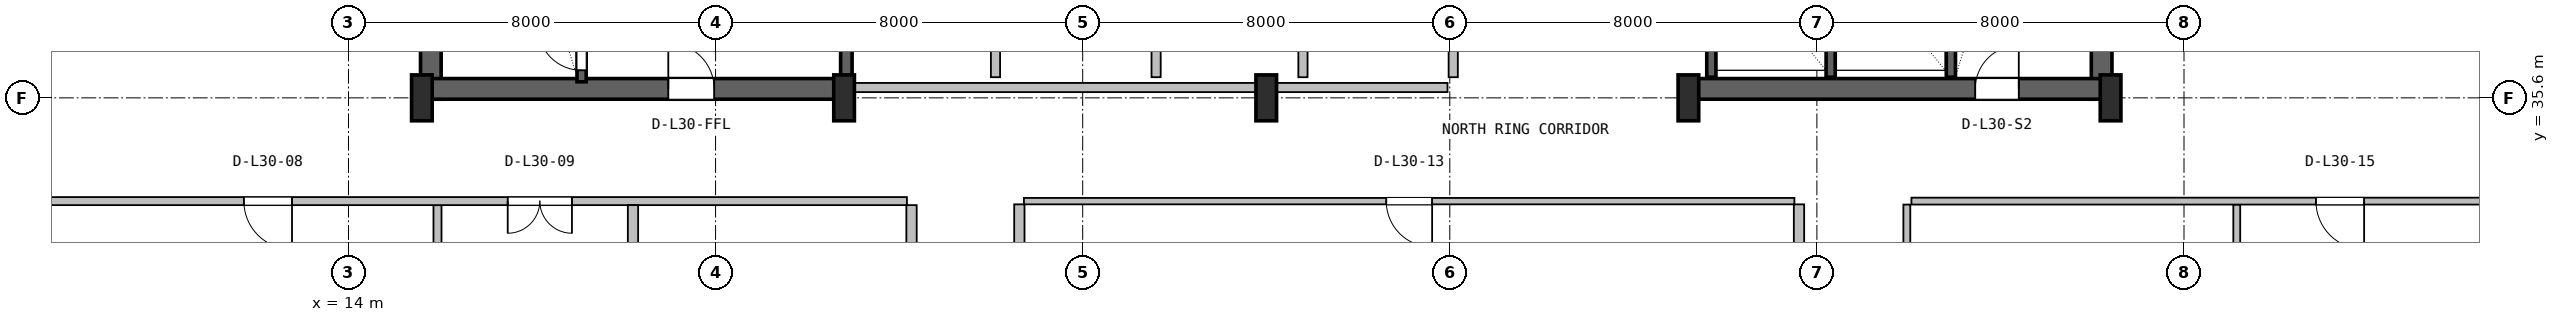
"""IFC4 building model, lengths in metres.
Left out: names, types, materials, properties, quantities, classifications, styles, units other than length and angle.
Written with IfcOpenShell. Run it as: python <this file> out.ifc"""

import sys

from ifc_helpers import new_model, si_unit, direction, frame, frame_2d, origin, origin_2d, place, context, subcontext, project, spatial, rectangle, i_section, extrude, source, transform, mapped, element, fill, save


model = new_model("IFC4")
c1 = context("Model", 3, precision=1e-05, world=origin(), true_north=direction((0.0, 1.0)))
c2 = subcontext(c1, "Body", "Model", "MODEL_VIEW")
j1 = project(units=[si_unit("LENGTHUNIT", "METRE"), si_unit("PLANEANGLEUNIT", "RADIAN")], contexts=[c1])
p1 = place(None, origin())
s1 = spatial("IfcSite", under=j1, at=p1, CompositionType="ELEMENT")
p2 = place(p1, origin())
s2 = spatial("IfcBuilding", under=s1, at=p2, CompositionType="ELEMENT")
p3 = place(p2, frame((0.0, 0.0, 125.8)))
s3 = spatial("IfcBuildingStorey", under=s2, at=p3, CompositionType="ELEMENT", Elevation=125.8)
for number, where, z_axis, x_axis in (
    (1, (15.795, 35.57, 0.0), (0.0, 0.0, 1.0), (0.0, 1.0, 0.0)),
    (2, (52.205, 35.57, 0.0), (0.0, 0.0, 1.0), (0.0, 1.0, 0.0)),
):
    element("IfcWall", number, at=place(p3, frame(where, z_axis=z_axis, x_axis=x_axis)), inside=s3, PredefinedType="SHEAR", context=c2, shape_type="SweptSolid", body=[
        extrude(rectangle(XDim=11.23, YDim=0.45, at=frame_2d((5.615, 0.0))), origin(), (0.0, 0.0, 1.0), 3.55),
    ])
p4 = place(p3, frame((15.57, 35.795, 0.0), z_axis=(0.0, 0.0, 1.0), x_axis=(1.0, 0.0, 0.0)))
e3 = element("IfcWall", 3, at=p4, inside=s3, PredefinedType="SHEAR", context=c2, shape_type="SweptSolid", body=[
    extrude(rectangle(XDim=9.23, YDim=0.45, at=frame_2d((4.615, 0.0))), origin(), (0.0, 0.0, 1.0), 3.55),
])
p5 = place(p4, frame((5.4, 0.0, 0.0)))
e4 = element("IfcOpeningElement", 4, at=p5, cuts=e3, PredefinedType="OPENING", context=c2, shape_type="SweptSolid", body=[
    extrude(rectangle(XDim=1.0, YDim=2.1, at=frame_2d((0.5, 1.05))), frame((0.0, 0.235, 0.0), z_axis=(0.0, -1.0, 0.0), x_axis=(1.0, 0.0, 0.0)), (0.0, 0.0, 1.0), 0.47),
])
p6 = place(p3, frame((43.2, 35.795, 0.0), z_axis=(0.0, 0.0, 1.0), x_axis=(1.0, 0.0, 0.0)))
e5 = element("IfcWall", 5, at=p6, inside=s3, PredefinedType="SHEAR", context=c2, shape_type="SweptSolid", body=[
    extrude(rectangle(XDim=9.23, YDim=0.45, at=frame_2d((4.615, 0.0))), origin(), (0.0, 0.0, 1.0), 3.55),
])
p7 = place(p6, frame((6.25, 0.0, 0.0)))
e6 = element("IfcOpeningElement", 6, at=p7, cuts=e5, PredefinedType="OPENING", context=c2, shape_type="SweptSolid", body=[
    extrude(rectangle(XDim=0.95, YDim=2.1, at=frame_2d((0.475, 1.05))), frame((0.0, 0.235, 0.0), z_axis=(0.0, -1.0, 0.0), x_axis=(1.0, 0.0, 0.0)), (0.0, 0.0, 1.0), 0.47),
])
m1 = source(origin(), c2, "Body", "SweptSolid", [
    extrude(i_section(OverallWidth=0.45, OverallDepth=1.0, WebThickness=0.016, FlangeThickness=0.03, FilletRadius=0.016, at=origin_2d()), origin(), (0.0, 0.0, 1.0), 3.8),
])
for number, where, z_axis, x_axis in (
    (7, (15.6, 35.6, 0.0), (0.0, 0.0, 1.0), (1.0, 0.0, 0.0)),
    (8, (24.8, 35.6, 0.0), (0.0, 0.0, 1.0), (1.0, 0.0, 0.0)),
    (9, (34.0, 35.6, 0.0), (0.0, 0.0, 1.0), (1.0, 0.0, 0.0)),
    (10, (43.2, 35.6, 0.0), (0.0, 0.0, 1.0), (1.0, 0.0, 0.0)),
    (11, (52.4, 35.6, 0.0), (0.0, 0.0, 1.0), (1.0, 0.0, 0.0)),
):
    element("IfcColumn", number, at=place(p3, frame(where, z_axis=z_axis, x_axis=x_axis)), inside=s3, PredefinedType="COLUMN", context=c2, shape_type="MappedRepresentation", body=[
        mapped(m1, transform((0.0, 0.0, 0.0), x_axis=(1.0, 0.0, 0.0), y_axis=(0.0, 1.0, 0.0), z_axis=(0.0, 0.0, 1.0), scale=1.0)),
    ])
p8 = place(p3, frame((19.08, 35.95, 0.0), z_axis=(0.0, 0.0, 1.0), x_axis=(0.0, 1.0, 0.0)))
e12 = element("IfcWall", 12, at=p8, inside=s3, PredefinedType="SHEAR", context=c2, shape_type="SweptSolid", body=[
    extrude(rectangle(XDim=9.65, YDim=0.2, at=frame_2d((4.825, 0.0))), origin(), (0.0, 0.0, 1.0), 3.55),
])
p9 = place(p8, frame((0.25, 0.0, 0.0)))
e13 = element("IfcOpeningElement", 13, at=p9, cuts=e12, PredefinedType="OPENING", context=c2, shape_type="SweptSolid", body=[
    extrude(rectangle(XDim=0.95, YDim=2.1, at=frame_2d((0.475, 1.05))), frame((0.0, 0.11, 0.0), z_axis=(0.0, -1.0, 0.0), x_axis=(1.0, 0.0, 0.0)), (0.0, 0.0, 1.0), 0.22),
])
p10 = place(p3, frame((24.85, 36.05, 0.0), z_axis=(0.0, 0.0, 1.0), x_axis=(0.0, 1.0, 0.0)))
e14 = element("IfcWall", 14, at=p10, inside=s3, PredefinedType="SHEAR", context=c2, shape_type="SweptSolid", body=[
    extrude(rectangle(XDim=10.45, YDim=0.25, at=frame_2d((5.225, 0.0))), origin(), (0.0, 0.0, 1.0), 3.55),
])
p11 = place(p3, frame((48.92, 36.05, 0.0), z_axis=(0.0, 0.0, 1.0), x_axis=(0.0, 1.0, 0.0)))
e15 = element("IfcWall", 15, at=p11, inside=s3, PredefinedType="SHEAR", context=c2, shape_type="SweptSolid", body=[
    extrude(rectangle(XDim=10.5, YDim=0.2, at=frame_2d((5.25, 0.0))), origin(), (0.0, 0.0, 1.0), 3.55),
])
for number, where, z_axis, x_axis in (
    (16, (43.7, 36.05, 0.0), (0.0, 0.0, 1.0), (0.0, 1.0, 0.0)),
    (17, (46.3, 36.05, 0.0), (0.0, 0.0, 1.0), (0.0, 1.0, 0.0)),
):
    element("IfcWall", number, at=place(p3, frame(where, z_axis=z_axis, x_axis=x_axis)), inside=s3, PredefinedType="SHEAR", context=c2, shape_type="SweptSolid", body=[
        extrude(rectangle(XDim=3.05, YDim=0.2, at=frame_2d((1.525, 0.0))), origin(), (0.0, 0.0, 1.0), 3.55),
    ])
p12 = place(p3, frame((25.0, 35.825, 0.0), z_axis=(0.0, 0.0, 1.0), x_axis=(1.0, 0.0, 0.0)))
e18 = element("IfcWall", 18, at=p12, inside=s3, PredefinedType="SOLIDWALL", context=c2, shape_type="SweptSolid", body=[
    extrude(rectangle(XDim=12.95, YDim=0.2, at=frame_2d((6.475, 0.0))), origin(), (0.0, 0.0, 1.0), 2.325),
])
for number, where, z_axis, x_axis in (
    (19, (28.1, 36.05, 0.0), (0.0, 0.0, 1.0), (0.0, 1.0, 0.0)),
    (20, (31.6, 36.05, 0.0), (0.0, 0.0, 1.0), (0.0, 1.0, 0.0)),
):
    element("IfcWall", number, at=place(p3, frame(where, z_axis=z_axis, x_axis=x_axis)), inside=s3, PredefinedType="PLUMBINGWALL", context=c2, shape_type="SweptSolid", body=[
        extrude(rectangle(XDim=3.1, YDim=0.2, at=frame_2d((1.55, 0.0))), origin(), (0.0, 0.0, 1.0), 3.53),
    ])
for number, where, z_axis, x_axis in (
    (21, (34.8, 36.05, 0.0), (0.0, 0.0, 1.0), (0.0, 1.0, 0.0)),
    (22, (38.075, 36.05, 0.0), (0.0, 0.0, 1.0), (0.0, 1.0, 0.0)),
):
    element("IfcWall", number, at=place(p3, frame(where, z_axis=z_axis, x_axis=x_axis)), inside=s3, PredefinedType="SOLIDWALL", context=c2, shape_type="SweptSolid", body=[
        extrude(rectangle(XDim=3.1, YDim=0.2, at=frame_2d((1.55, 0.0))), origin(), (0.0, 0.0, 1.0), 3.53),
    ])
p13 = place(p3, frame((15.94, 15.183, 0.0), z_axis=(0.0, 0.0, 1.0), x_axis=(0.0, 1.0, 0.0)))
e23 = element("IfcWall", 23, at=p13, inside=s3, PredefinedType="PARTITIONING", context=c2, shape_type="SweptSolid", body=[
    extrude(rectangle(XDim=18.08, YDim=0.175, at=frame_2d((9.04, 0.0))), origin(), (0.0, 0.0, 1.0), 3.222),
])
p14 = place(p3, frame((4.68, 33.35, 0.0), z_axis=(0.0, 0.0, 1.0), x_axis=(1.0, 0.0, 0.0)))
e24 = element("IfcWall", 24, at=p14, inside=s3, PredefinedType="PARTITIONING", context=c2, shape_type="SweptSolid", body=[
    extrude(rectangle(XDim=21.49, YDim=0.175, at=frame_2d((10.745, 0.0))), origin(), (0.0, 0.0, 1.0), 2.83),
])
p15 = place(p14, frame((7.04, 0.0, 0.0)))
e25 = element("IfcOpeningElement", 25, at=p15, cuts=e24, PredefinedType="OPENING", context=c2, shape_type="SweptSolid", body=[
    extrude(rectangle(XDim=1.05, YDim=2.1, at=frame_2d((0.525, 1.05))), frame((0.0, 0.098, 0.0), z_axis=(0.0, -1.0, 0.0), x_axis=(1.0, 0.0, 0.0)), (0.0, 0.0, 1.0), 0.195),
])
p16 = place(p14, frame((12.79, 0.0, 0.0)))
e26 = element("IfcOpeningElement", 26, at=p16, cuts=e24, PredefinedType="OPENING", context=c2, shape_type="SweptSolid", body=[
    extrude(rectangle(XDim=1.4, YDim=2.12, at=frame_2d((0.7, 1.06))), frame((0.0, 0.098, 0.0), z_axis=(0.0, -1.0, 0.0), x_axis=(1.0, 0.0, 0.0)), (0.0, 0.0, 1.0), 0.195),
])
p17 = place(p3, frame((20.2, 15.183, 0.0), z_axis=(0.0, 0.0, 1.0), x_axis=(0.0, 1.0, 0.0)))
e27 = element("IfcWall", 27, at=p17, inside=s3, PredefinedType="PARTITIONING", context=c2, shape_type="SweptSolid", body=[
    extrude(rectangle(XDim=18.08, YDim=0.225, at=frame_2d((9.04, 0.0))), origin(), (0.0, 0.0, 1.0), 3.222),
])
p18 = place(p3, frame((26.27, 15.183, 0.0), z_axis=(0.0, 0.0, 1.0), x_axis=(0.0, 1.0, 0.0)))
e28 = element("IfcWall", 28, at=p18, inside=s3, PredefinedType="PARTITIONING", context=c2, shape_type="SweptSolid", body=[
    extrude(rectangle(XDim=18.08, YDim=0.225, at=frame_2d((9.04, 0.0))), origin(), (0.0, 0.0, 1.0), 2.83),
])
p19 = place(p18, frame((8.334, 0.0, 0.0)))
e29 = element("IfcOpeningElement", 29, at=p19, cuts=e28, PredefinedType="OPENING", context=c2, shape_type="SweptSolid", body=[
    extrude(rectangle(XDim=1.4, YDim=2.12, at=frame_2d((0.7, 1.06))), frame((0.0, 0.123, 0.0), z_axis=(0.0, -1.0, 0.0), x_axis=(1.0, 0.0, 0.0)), (0.0, 0.0, 1.0), 0.245),
])
p20 = place(p3, frame((45.61, 17.533, 0.0), z_axis=(0.0, 0.0, 1.0), x_axis=(0.0, 1.0, 0.0)))
e30 = element("IfcWall", 30, at=p20, inside=s3, PredefinedType="PARTITIONING", context=c2, shape_type="SweptSolid", body=[
    extrude(rectangle(XDim=15.747, YDim=0.225, at=frame_2d((7.874, 0.0))), origin(), (0.0, 0.0, 1.0), 3.222),
])
p21 = place(p20, frame((8.162, 0.0, 0.0)))
e31 = element("IfcOpeningElement", 31, at=p21, cuts=e30, PredefinedType="OPENING", context=c2, shape_type="SweptSolid", body=[
    extrude(rectangle(XDim=0.92, YDim=2.08, at=frame_2d((0.46, 1.04))), frame((0.0, 0.123, 0.0), z_axis=(0.0, -1.0, 0.0), x_axis=(1.0, 0.0, 0.0)), (0.0, 0.0, 1.0), 0.245),
])
p22 = place(p3, frame((28.62, 17.533, 0.0), z_axis=(0.0, 0.0, 1.0), x_axis=(0.0, 1.0, 0.0)))
e32 = element("IfcWall", 32, at=p22, inside=s3, PredefinedType="PARTITIONING", context=c2, shape_type="SweptSolid", body=[
    extrude(rectangle(XDim=15.747, YDim=0.225, at=frame_2d((7.874, 0.0))), origin(), (0.0, 0.0, 1.0), 2.83),
])
p23 = place(p3, frame((28.72, 33.35, 0.0), z_axis=(0.0, 0.0, 1.0), x_axis=(1.0, 0.0, 0.0)))
e33 = element("IfcWall", 33, at=p23, inside=s3, PredefinedType="PARTITIONING", context=c2, shape_type="SweptSolid", body=[
    extrude(rectangle(XDim=16.79, YDim=0.14, at=frame_2d((8.395, 0.0))), origin(), (0.0, 0.0, 1.0), 2.83),
])
p24 = place(p23, frame((7.895, 0.0, 0.0)))
e34 = element("IfcOpeningElement", 34, at=p24, cuts=e33, PredefinedType="OPENING", context=c2, shape_type="SweptSolid", body=[
    extrude(rectangle(XDim=1.0, YDim=2.1, at=frame_2d((0.5, 1.05))), frame((0.0, 0.08, 0.0), z_axis=(0.0, -1.0, 0.0), x_axis=(1.0, 0.0, 0.0)), (0.0, 0.0, 1.0), 0.16),
])
p25 = place(p3, frame((55.15, 15.183, 0.0), z_axis=(0.0, 0.0, 1.0), x_axis=(0.0, 1.0, 0.0)))
e35 = element("IfcWall", 35, at=p25, inside=s3, PredefinedType="PARTITIONING", context=c2, shape_type="SweptSolid", body=[
    extrude(rectangle(XDim=18.092, YDim=0.15, at=frame_2d((9.046, 0.0))), origin(), (0.0, 0.0, 1.0), 3.222),
])
p26 = place(p3, frame((48.06, 33.35, 0.0), z_axis=(0.0, 0.0, 1.0), x_axis=(1.0, 0.0, 0.0)))
e36 = element("IfcWall", 36, at=p26, inside=s3, PredefinedType="PARTITIONING", context=c2, shape_type="SweptSolid", body=[
    extrude(rectangle(XDim=15.26, YDim=0.15, at=frame_2d((7.63, 0.0))), origin(), (0.0, 0.0, 1.0), 3.108),
])
p27 = place(p26, frame((8.815, 0.0, 0.0)))
e37 = element("IfcOpeningElement", 37, at=p27, cuts=e36, PredefinedType="OPENING", context=c2, shape_type="SweptSolid", body=[
    extrude(rectangle(XDim=1.05, YDim=2.1, at=frame_2d((0.525, 1.05))), frame((0.0, 0.085, 0.0), z_axis=(0.0, -1.0, 0.0), x_axis=(1.0, 0.0, 0.0)), (0.0, 0.0, 1.0), 0.17),
])
p28 = place(p3, frame((47.96, 15.183, 0.0), z_axis=(0.0, 0.0, 1.0), x_axis=(0.0, 1.0, 0.0)))
e38 = element("IfcWall", 38, at=p28, inside=s3, PredefinedType="PARTITIONING", context=c2, shape_type="SweptSolid", body=[
    extrude(rectangle(XDim=18.092, YDim=0.15, at=frame_2d((9.046, 0.0))), origin(), (0.0, 0.0, 1.0), 3.222),
])
p29 = place(p28, frame((8.594, 0.0, 0.0)))
e39 = element("IfcOpeningElement", 39, at=p29, cuts=e38, PredefinedType="OPENING", context=c2, shape_type="SweptSolid", body=[
    extrude(rectangle(XDim=0.88, YDim=2.06, at=frame_2d((0.44, 1.03))), frame((0.0, 0.085, 0.0), z_axis=(0.0, -1.0, 0.0), x_axis=(1.0, 0.0, 0.0)), (0.0, 0.0, 1.0), 0.17),
])
m2 = source(origin(), c2, "Body", "SweptSolid", [
    extrude(rectangle(XDim=0.95, YDim=2.1, at=frame_2d((0.475, 1.05))), frame((0.0, 0.025, 0.0), z_axis=(0.0, -1.0, 0.0), x_axis=(1.0, 0.0, 0.0)), (0.0, 0.0, 1.0), 0.05),
])
p30 = place(p9, origin())
e40 = element("IfcDoor", 40, at=p30, inside=s3, OperationType="SINGLE_SWING_RIGHT", PredefinedType="DOOR", context=c2, shape_type="MappedRepresentation", body=[
    mapped(m2, transform((0.0, 0.0, 0.0), x_axis=(1.0, 0.0, 0.0), y_axis=(0.0, 1.0, 0.0), z_axis=(0.0, 0.0, 1.0), scale=1.0)),
])
fill(e13, e40)
m3 = source(origin(), c2, "Body", "SweptSolid", [
    extrude(rectangle(XDim=1.0, YDim=2.1, at=frame_2d((0.5, 1.05))), frame((0.0, 0.025, 0.0), z_axis=(0.0, -1.0, 0.0), x_axis=(1.0, 0.0, 0.0)), (0.0, 0.0, 1.0), 0.05),
])
p31 = place(p5, origin())
e41 = element("IfcDoor", 41, at=p31, inside=s3, OperationType="SINGLE_SWING_LEFT", PredefinedType="DOOR", context=c2, shape_type="MappedRepresentation", body=[
    mapped(m3, transform((0.0, 0.0, 0.0), x_axis=(1.0, 0.0, 0.0), y_axis=(0.0, 1.0, 0.0), z_axis=(0.0, 0.0, 1.0), scale=1.0)),
])
fill(e4, e41)
p32 = place(p7, origin())
e42 = element("IfcDoor", 42, at=p32, inside=s3, OperationType="SINGLE_SWING_RIGHT", PredefinedType="DOOR", context=c2, shape_type="MappedRepresentation", body=[
    mapped(m2, transform((0.0, 0.0, 0.0), x_axis=(1.0, 0.0, 0.0), y_axis=(0.0, 1.0, 0.0), z_axis=(0.0, 0.0, 1.0), scale=1.0)),
])
fill(e6, e42)
m4 = source(origin(), c2, "Body", "SweptSolid", [
    extrude(rectangle(XDim=1.05, YDim=2.1, at=frame_2d((0.525, 1.05))), frame((0.0, 0.025, 0.0), z_axis=(0.0, -1.0, 0.0), x_axis=(1.0, 0.0, 0.0)), (0.0, 0.0, 1.0), 0.05),
])
p33 = place(p15, frame((1.05, 0.0, 0.0), z_axis=(0.0, 0.0, 1.0), x_axis=(-1.0, 0.0, 0.0)))
e43 = element("IfcDoor", 43, at=p33, inside=s3, OperationType="SINGLE_SWING_RIGHT", PredefinedType="DOOR", context=c2, shape_type="MappedRepresentation", body=[
    mapped(m4, transform((0.0, 0.0, 0.0), x_axis=(1.0, 0.0, 0.0), y_axis=(0.0, 1.0, 0.0), z_axis=(0.0, 0.0, 1.0), scale=1.0)),
])
fill(e25, e43)
m5 = source(origin(), c2, "Body", "SweptSolid", [
    extrude(rectangle(XDim=1.4, YDim=2.12, at=frame_2d((0.7, 1.06))), frame((0.0, 0.025, 0.0), z_axis=(0.0, -1.0, 0.0), x_axis=(1.0, 0.0, 0.0)), (0.0, 0.0, 1.0), 0.05),
])
p34 = place(p16, frame((1.4, 0.0, 0.0), z_axis=(0.0, 0.0, 1.0), x_axis=(-1.0, 0.0, 0.0)))
e44 = element("IfcDoor", 44, at=p34, inside=s3, OperationType="DOUBLE_DOOR_SINGLE_SWING", PredefinedType="DOOR", context=c2, shape_type="MappedRepresentation", body=[
    mapped(m5, transform((0.0, 0.0, 0.0), x_axis=(1.0, 0.0, 0.0), y_axis=(0.0, 1.0, 0.0), z_axis=(0.0, 0.0, 1.0), scale=1.0)),
])
fill(e26, e44)
m6 = source(origin(), c2, "Body", "SweptSolid", [
    extrude(rectangle(XDim=1.0, YDim=2.1, at=frame_2d((0.5, 1.05))), frame((0.0, 0.025, 0.0), z_axis=(0.0, -1.0, 0.0), x_axis=(1.0, 0.0, 0.0)), (0.0, 0.0, 1.0), 0.05),
])
p35 = place(p24, frame((1.0, 0.0, 0.0), z_axis=(0.0, 0.0, 1.0), x_axis=(-1.0, 0.0, 0.0)))
e45 = element("IfcDoor", 45, at=p35, inside=s3, OperationType="SINGLE_SWING_RIGHT", PredefinedType="DOOR", context=c2, shape_type="MappedRepresentation", body=[
    mapped(m6, transform((0.0, 0.0, 0.0), x_axis=(1.0, 0.0, 0.0), y_axis=(0.0, 1.0, 0.0), z_axis=(0.0, 0.0, 1.0), scale=1.0)),
])
fill(e34, e45)
p36 = place(p27, frame((1.05, 0.0, 0.0), z_axis=(0.0, 0.0, 1.0), x_axis=(-1.0, 0.0, 0.0)))
e46 = element("IfcDoor", 46, at=p36, inside=s3, OperationType="SINGLE_SWING_RIGHT", PredefinedType="DOOR", context=c2, shape_type="MappedRepresentation", body=[
    mapped(m4, transform((0.0, 0.0, 0.0), x_axis=(1.0, 0.0, 0.0), y_axis=(0.0, 1.0, 0.0), z_axis=(0.0, 0.0, 1.0), scale=1.0)),
])
fill(e37, e46)
save(model, sys.argv[1])
